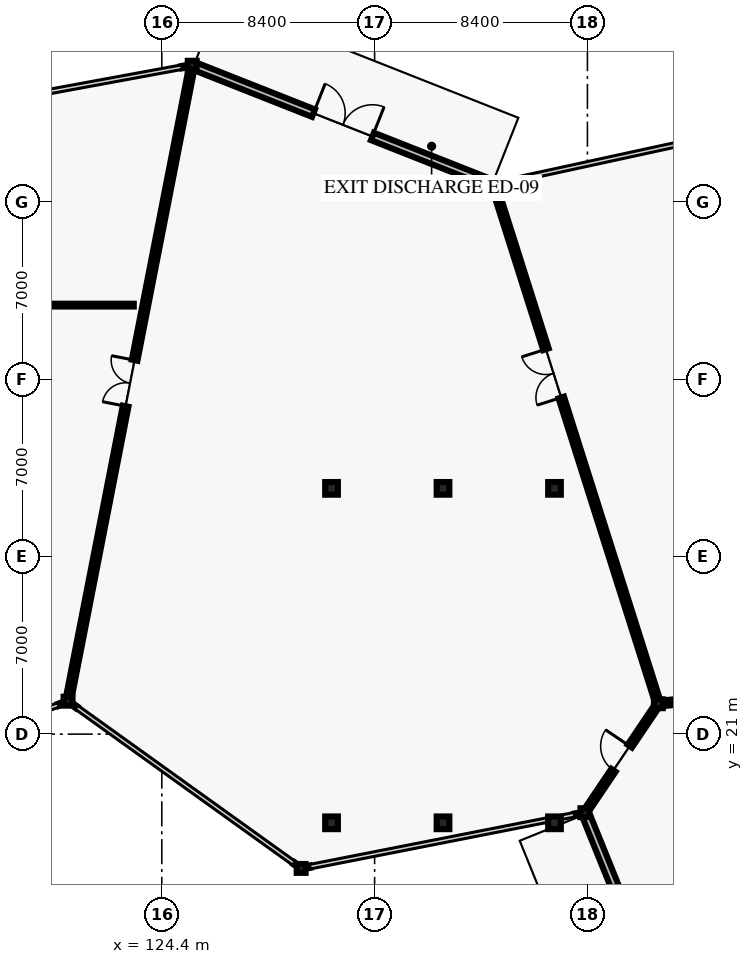
"""IFC4 building model, lengths in metres.
Left out: names, types, materials, properties, quantities, classifications, styles, units other than length and angle.
Written with IfcOpenShell. Run it as: python <this file> out.ifc"""

import sys

from ifc_helpers import new_model, si_unit, direction, frame, frame_2d, origin, origin_2d, place, context, subcontext, project, spatial, rectangle, i_section, extrude, element, fill, save


model = new_model("IFC4")
c1 = context("Model", 3, precision=1e-05, world=origin(), true_north=direction((0.0, 1.0)))
c2 = subcontext(c1, "Body", "Model", "MODEL_VIEW")
j1 = project(units=[si_unit("LENGTHUNIT", "METRE"), si_unit("PLANEANGLEUNIT", "RADIAN")], contexts=[c1])
p1 = place(None, origin())
s1 = spatial("IfcSite", under=j1, at=p1, CompositionType="ELEMENT")
p2 = place(p1, origin())
s2 = spatial("IfcBuilding", under=s1, at=p2, CompositionType="ELEMENT")
p3 = place(p2, origin())
s3 = spatial("IfcBuildingStorey", under=s2, at=p3, CompositionType="ELEMENT", Elevation=0.0)
for number, where, z_axis, x_axis in (
    (1, (120.7, 22.3, 0.0), (0.0, 0.0, 1.0), (1.0, 0.0, 0.0)),
    (2, (125.6, 47.4, 0.0), (0.0, 0.0, 1.0), (1.0, 0.0, 0.0)),
    (3, (129.9, 15.7, 0.0), (0.0, 0.0, 1.0), (1.0, 0.0, 0.0)),
    (4, (137.5, 42.7, 0.0), (0.0, 0.0, 1.0), (1.0, 0.0, 0.0)),
    (5, (141.1, 17.9, 0.0), (0.0, 0.0, 1.0), (1.0, 0.0, 0.0)),
    (6, (144.0, 22.2, 0.0), (0.0, 0.0, 1.0), (1.0, 0.0, 0.0)),
):
    element("IfcColumn", number, at=place(p3, frame(where, z_axis=z_axis, x_axis=x_axis)), inside=s3, PredefinedType="COLUMN", context=c2, shape_type="SweptSolid", body=[
        extrude(i_section(OverallWidth=0.35, OverallDepth=0.35, WebThickness=0.02, FlangeThickness=0.028, at=origin_2d()), origin(), (0.0, 0.0, 1.0), 5.4),
    ])
for number, where, z_axis, x_axis in (
    (7, (131.1, 17.5, 0.0), (0.0, 0.0, 1.0), (1.0, 0.0, 0.0)),
    (8, (131.1, 30.7, 0.0), (0.0, 0.0, 1.0), (1.0, 0.0, 0.0)),
    (9, (135.5, 17.5, 0.0), (0.0, 0.0, 1.0), (1.0, 0.0, 0.0)),
    (10, (135.5, 30.7, 0.0), (0.0, 0.0, 1.0), (1.0, 0.0, 0.0)),
    (11, (139.9, 17.5, 0.0), (0.0, 0.0, 1.0), (1.0, 0.0, 0.0)),
    (12, (139.9, 30.7, 0.0), (0.0, 0.0, 1.0), (1.0, 0.0, 0.0)),
):
    element("IfcColumn", number, at=place(p3, frame(where, z_axis=z_axis, x_axis=x_axis)), inside=s3, PredefinedType="COLUMN", context=c2, shape_type="SweptSolid", body=[
        extrude(i_section(OverallWidth=0.5, OverallDepth=0.5, WebThickness=0.022, FlangeThickness=0.036, at=origin_2d()), origin(), (0.0, 0.0, 1.0), 5.4),
    ])
for number, where, z_axis, x_axis in (
    (13, (120.605, 22.264, 0.0), (0.0, 0.0, 1.0), (-0.935, -0.354, 0.0)),
    (14, (125.193, 47.325, 0.0), (0.0, 0.0, 1.0), (0.984, 0.178, 0.0)),
):
    element("IfcWall", number, at=place(p3, frame(where, z_axis=z_axis, x_axis=x_axis)), inside=s3, PredefinedType="SOLIDWALL", context=c2, shape_type="SweptSolid", body=[
        extrude(rectangle(XDim=0.308, YDim=0.095, at=frame_2d((0.154, 0.0))), origin(), (0.0, 0.0, 1.0), 4.22),
    ])
p4 = place(p3, frame((125.657, 47.378, 0.0), z_axis=(0.0, 0.0, 1.0), x_axis=(0.930068974863, -0.367384950696, 0.0)))
e15 = element("IfcWall", 15, at=p4, inside=s3, PredefinedType="SOLIDWALL", context=c2, shape_type="SweptSolid", body=[
    extrude(rectangle(XDim=12.673, YDim=0.315, at=frame_2d((6.337, 0.0))), origin(), (0.0, 0.0, 1.0), 4.22),
])
p5 = place(p4, frame((5.087, 0.0, 0.0)))
e16 = element("IfcOpeningElement", 16, at=p5, cuts=e15, PredefinedType="OPENING", context=c2, shape_type="SweptSolid", body=[
    extrude(rectangle(XDim=2.5, YDim=2.45, at=frame_2d((1.25, 1.225))), frame((0.0, 0.167, 0.0), z_axis=(0.0, -1.0, 0.0), x_axis=(1.0, 0.0, 0.0)), (0.0, 0.0, 1.0), 0.335),
])
for number, where, z_axis, x_axis in (
    (17, (129.866, 15.724, 0.0), (0.0, 0.0, 1.0), (-0.812, 0.584, 0.0)),
    (18, (121.033, 22.061, 0.0), (0.0, 0.0, 1.0), (-0.812, 0.584, 0.0)),
):
    element("IfcWall", number, at=place(p3, frame(where, z_axis=z_axis, x_axis=x_axis)), inside=s3, PredefinedType="SOLIDWALL", context=c2, shape_type="SweptSolid", body=[
        extrude(rectangle(XDim=0.308, YDim=0.095, at=frame_2d((0.154, 0.0))), origin(), (0.0, 0.0, 1.0), 4.22),
    ])
for number, where, z_axis, x_axis in (
    (19, (141.0, 17.88, 0.0), (0.0, 0.0, 1.0), (-0.982, -0.191, 0.0)),
    (20, (130.243, 15.767, 0.0), (0.0, 0.0, 1.0), (-0.981, -0.192, 0.0)),
):
    element("IfcWall", number, at=place(p3, frame(where, z_axis=z_axis, x_axis=x_axis)), inside=s3, PredefinedType="SOLIDWALL", context=c2, shape_type="SweptSolid", body=[
        extrude(rectangle(XDim=0.308, YDim=0.095, at=frame_2d((0.154, 0.0))), origin(), (0.0, 0.0, 1.0), 4.22),
    ])
p6 = place(p3, frame((147.3, 2.6, 0.0), z_axis=(0.0, 0.0, 1.0), x_axis=(-0.375550747937, 0.92680183196, 0.0)))
e21 = element("IfcWall", 21, at=p6, inside=s3, PredefinedType="SOLIDWALL", context=c2, shape_type="SweptSolid", body=[
    extrude(rectangle(XDim=16.448, YDim=0.315, at=frame_2d((8.224, 0.0))), origin(), (0.0, 0.0, 1.0), 4.22),
])
p7 = place(p6, frame((6.949, 0.0, 0.0)))
e22 = element("IfcOpeningElement", 22, at=p7, cuts=e21, PredefinedType="OPENING", context=c2, shape_type="SweptSolid", body=[
    extrude(rectangle(XDim=2.55, YDim=2.5, at=frame_2d((1.275, 1.25))), frame((0.0, 0.167, 0.0), z_axis=(0.0, -1.0, 0.0), x_axis=(1.0, 0.0, 0.0)), (0.0, 0.0, 1.0), 0.335),
])
p8 = place(p3, frame((137.6, 42.722, 0.0), z_axis=(0.0, 0.0, 1.0), x_axis=(0.977312194123, 0.211803860252, 0.0)))
e23 = element("IfcWall", 23, at=p8, inside=s3, PredefinedType="SOLIDWALL", context=c2, shape_type="SweptSolid", body=[
    extrude(rectangle(XDim=0.308, YDim=0.095, at=frame_2d((0.154, 0.0))), origin(), (0.0, 0.0, 1.0), 4.22),
])
p9 = place(p3, frame((120.7, 22.3, 0.0), z_axis=(0.0, 0.0, 1.0), x_axis=(0.191608827438, 0.981471373626, 0.0)))
e24 = element("IfcWall", 24, at=p9, inside=s3, PredefinedType="SOLIDWALL", context=c2, shape_type="SweptSolid", body=[
    extrude(rectangle(XDim=25.574, YDim=0.225, at=frame_2d((12.787, 0.0))), origin(), (0.0, 0.0, 1.0), 4.62),
])
p10 = place(p9, frame((11.862, 0.0, 0.0)))
e25 = element("IfcOpeningElement", 25, at=p10, cuts=e24, PredefinedType="OPENING", context=c2, shape_type="SweptSolid", body=[
    extrude(rectangle(XDim=1.85, YDim=2.4, at=frame_2d((0.925, 1.2))), frame((0.0, 0.123, 0.0), z_axis=(0.0, -1.0, 0.0), x_axis=(1.0, 0.0, 0.0)), (0.0, 0.0, 1.0), 0.245),
])
p11 = place(p3, frame((141.1, 17.9, 0.0), z_axis=(0.0, 0.0, 1.0), x_axis=(0.559124361662, 0.829083800467, 0.0)))
e26 = element("IfcWall", 26, at=p11, inside=s3, PredefinedType="SOLIDWALL", context=c2, shape_type="SweptSolid", body=[
    extrude(rectangle(XDim=5.187, YDim=0.205, at=frame_2d((2.593, 0.0))), origin(), (0.0, 0.0, 1.0), 3.92),
])
p12 = place(p11, frame((2.018, 0.0, 0.0)))
e27 = element("IfcOpeningElement", 27, at=p12, cuts=e26, PredefinedType="OPENING", context=c2, shape_type="SweptSolid", body=[
    extrude(rectangle(XDim=1.15, YDim=2.2, at=frame_2d((0.575, 1.1))), frame((0.0, 0.113, 0.0), z_axis=(0.0, -1.0, 0.0), x_axis=(1.0, 0.0, 0.0)), (0.0, 0.0, 1.0), 0.225),
])
p13 = place(p3, frame((144.0, 22.2, 0.0), z_axis=(0.0, 0.0, 1.0), x_axis=(-0.302243860734, 0.953230637699, 0.0)))
e28 = element("IfcWall", 28, at=p13, inside=s3, PredefinedType="SOLIDWALL", context=c2, shape_type="SweptSolid", body=[
    extrude(rectangle(XDim=21.506, YDim=0.225, at=frame_2d((10.753, 0.0))), origin(), (0.0, 0.0, 1.0), 4.62),
])
p14 = place(p13, frame((12.679, 0.0, 0.0)))
e29 = element("IfcOpeningElement", 29, at=p14, cuts=e28, PredefinedType="OPENING", context=c2, shape_type="SweptSolid", body=[
    extrude(rectangle(XDim=2.0, YDim=2.5, at=frame_2d((1.0, 1.25))), frame((0.0, 0.123, 0.0), z_axis=(0.0, -1.0, 0.0), x_axis=(1.0, 0.0, 0.0)), (0.0, 0.0, 1.0), 0.245),
])
p15 = place(p3, frame((162.0, 24.0, 0.0), z_axis=(0.0, 0.0, 1.0), x_axis=(-0.995036922958, -0.099506391506, 0.0)))
e30 = element("IfcWall", 30, at=p15, inside=s3, PredefinedType="SOLIDWALL", context=c2, shape_type="SweptSolid", body=[
    extrude(rectangle(XDim=18.09, YDim=0.225, at=frame_2d((9.045, 0.0))), origin(), (0.0, 0.0, 1.0), 4.62),
])
p16 = place(p15, frame((8.12, 0.0, 0.0)))
e31 = element("IfcOpeningElement", 31, at=p16, cuts=e30, PredefinedType="OPENING", context=c2, shape_type="SweptSolid", body=[
    extrude(rectangle(XDim=1.85, YDim=2.4, at=frame_2d((0.925, 1.2))), frame((0.0, 0.123, 0.0), z_axis=(0.0, -1.0, 0.0), x_axis=(1.0, 0.0, 0.0)), (0.0, 0.0, 1.0), 0.245),
])
p17 = place(p3, frame((114.0, 37.933, 0.0), z_axis=(0.0, 0.0, 1.0), x_axis=(1.0, 0.0, 0.0)))
e32 = element("IfcWall", 32, at=p17, inside=s3, PredefinedType="PARTITIONING", context=c2, shape_type="SweptSolid", body=[
    extrude(rectangle(XDim=9.293, YDim=0.11, at=frame_2d((4.646, 0.0))), origin(), (0.0, 0.0, 1.0), 3.92),
])
p18 = place(p17, frame((4.157, 0.0, 0.0)))
e33 = element("IfcOpeningElement", 33, at=p18, cuts=e32, PredefinedType="OPENING", context=c2, shape_type="SweptSolid", body=[
    extrude(rectangle(XDim=0.98, YDim=2.15, at=frame_2d((0.49, 1.075))), frame((0.0, 0.065, 0.0), z_axis=(0.0, -1.0, 0.0), x_axis=(1.0, 0.0, 0.0)), (0.0, 0.0, 1.0), 0.13),
])
p19 = place(p5, origin())
e34 = element("IfcDoor", 34, at=p19, inside=s3, OperationType="DOUBLE_DOOR_SINGLE_SWING", PredefinedType="DOOR", context=c2, shape_type="SweptSolid", body=[
    extrude(rectangle(XDim=2.5, YDim=2.45, at=frame_2d((1.25, 1.225))), frame((0.0, 0.025, 0.0), z_axis=(0.0, -1.0, 0.0), x_axis=(1.0, 0.0, 0.0)), (0.0, 0.0, 1.0), 0.05),
])
fill(e16, e34)
p20 = place(p10, origin())
e35 = element("IfcDoor", 35, at=p20, inside=s3, OperationType="DOUBLE_DOOR_SINGLE_SWING", PredefinedType="DOOR", context=c2, shape_type="SweptSolid", body=[
    extrude(rectangle(XDim=1.85, YDim=2.4, at=frame_2d((0.925, 1.2))), frame((0.0, 0.025, 0.0), z_axis=(0.0, -1.0, 0.0), x_axis=(1.0, 0.0, 0.0)), (0.0, 0.0, 1.0), 0.05),
])
fill(e25, e35)
p21 = place(p12, origin())
e36 = element("IfcDoor", 36, at=p21, inside=s3, OperationType="SINGLE_SWING_RIGHT", PredefinedType="DOOR", context=c2, shape_type="SweptSolid", body=[
    extrude(rectangle(XDim=1.15, YDim=2.2, at=frame_2d((0.575, 1.1))), frame((0.0, 0.025, 0.0), z_axis=(0.0, -1.0, 0.0), x_axis=(1.0, 0.0, 0.0)), (0.0, 0.0, 1.0), 0.05),
])
fill(e27, e36)
p22 = place(p14, origin())
e37 = element("IfcDoor", 37, at=p22, inside=s3, OperationType="DOUBLE_DOOR_SINGLE_SWING", PredefinedType="DOOR", context=c2, shape_type="SweptSolid", body=[
    extrude(rectangle(XDim=2.0, YDim=2.5, at=frame_2d((1.0, 1.25))), frame((0.0, 0.025, 0.0), z_axis=(0.0, -1.0, 0.0), x_axis=(1.0, 0.0, 0.0)), (0.0, 0.0, 1.0), 0.05),
])
fill(e29, e37)
save(model, sys.argv[1])
